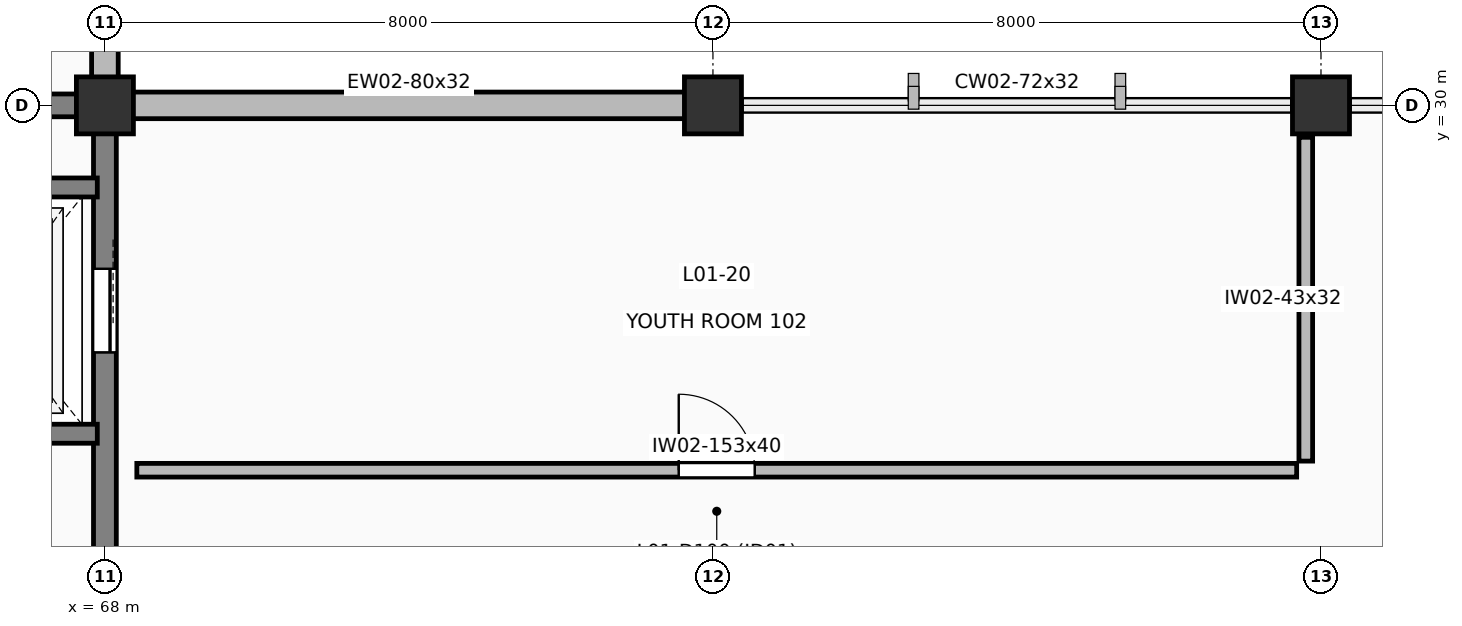
"""IFC4 building model, lengths in metres.
Left out: names, types, materials, properties, quantities, classifications, styles, units other than length and angle.
Written with IfcOpenShell. Run it as: python <this file> out.ifc"""

import sys

from ifc_helpers import new_model, si_unit, direction, frame, frame_2d, origin, origin_2d, place, context, subcontext, project, spatial, rectangle, extrude, element, fill, save


model = new_model("IFC4")
c1 = context("Model", 3, precision=1e-05, world=origin(), true_north=direction((0.0, 1.0)))
c2 = subcontext(c1, "Body", "Model", "MODEL_VIEW")
j1 = project(units=[si_unit("LENGTHUNIT", "METRE"), si_unit("PLANEANGLEUNIT", "RADIAN")], contexts=[c1])
p1 = place(None, origin())
s1 = spatial("IfcSite", under=j1, at=p1, CompositionType="ELEMENT")
p2 = place(p1, origin())
s2 = spatial("IfcBuilding", under=s1, at=p2, CompositionType="ELEMENT")
p3 = place(p2, frame((0.0, 0.0, 5.4)))
s3 = spatial("IfcBuildingStorey", under=s2, at=p3, CompositionType="ELEMENT", Elevation=5.4)
for number, where, z_axis, x_axis in (
    (1, (68.0, 30.0, 0.0), (0.0, 0.0, 1.0), (1.0, 0.0, 0.0)),
    (2, (76.0, 30.0, 0.0), (0.0, 0.0, 1.0), (1.0, 0.0, 0.0)),
    (3, (84.0, 30.0, 0.0), (0.0, 0.0, 1.0), (1.0, 0.0, 0.0)),
):
    element("IfcColumn", number, at=place(p3, frame(where, z_axis=z_axis, x_axis=x_axis)), inside=s3, PredefinedType="COLUMN", context=c2, shape_type="SweptSolid", body=[
        extrude(rectangle(XDim=0.75, YDim=0.75, at=origin_2d()), origin(), (0.0, 0.0, 1.0), 4.2),
    ])
p4 = place(p3, frame((68.0, 38.0, 0.0), z_axis=(0.0, 0.0, 1.0), x_axis=(0.0, -1.0, 0.0)))
e4 = element("IfcWall", 4, at=p4, inside=s3, PredefinedType="SOLIDWALL", context=c2, shape_type="SweptSolid", body=[
    extrude(rectangle(XDim=8.0, YDim=0.35, at=frame_2d((4.0, 0.0))), origin(), (0.0, 0.0, 1.0), 3.245),
])
p5 = place(p3, frame((68.0, 30.0, 0.0), z_axis=(0.0, 0.0, 1.0), x_axis=(1.0, 0.0, 0.0)))
e5 = element("IfcWall", 5, at=p5, inside=s3, PredefinedType="SOLIDWALL", context=c2, shape_type="SweptSolid", body=[
    extrude(rectangle(XDim=8.0, YDim=0.35, at=frame_2d((4.0, 0.0))), origin(), (0.0, 0.0, 1.0), 3.165),
])
p6 = place(p3, frame((60.0, 30.0, 0.0), z_axis=(0.0, 0.0, 1.0), x_axis=(1.0, 0.0, 0.0)))
e6 = element("IfcWall", 6, at=p6, inside=s3, PredefinedType="SHEAR", context=c2, shape_type="SweptSolid", body=[
    extrude(rectangle(XDim=8.0, YDim=0.3, at=frame_2d((4.0, 0.0))), origin(), (0.0, 0.0, 1.0), 4.2),
])
p7 = place(p3, frame((68.0, 30.0, 0.0), z_axis=(0.0, 0.0, 1.0), x_axis=(0.0, -1.0, 0.0)))
e7 = element("IfcWall", 7, at=p7, inside=s3, PredefinedType="SHEAR", context=c2, shape_type="SweptSolid", body=[
    extrude(rectangle(XDim=8.0, YDim=0.3, at=frame_2d((4.0, 0.0))), origin(), (0.0, 0.0, 1.0), 4.2),
])
p8 = place(p7, frame((6.3, 0.0, 0.0)))
e8 = element("IfcOpeningElement", 8, at=p8, cuts=e7, PredefinedType="OPENING", context=c2, shape_type="SweptSolid", body=[
    extrude(rectangle(XDim=1.1, YDim=2.2, at=frame_2d((0.55, 1.1))), frame((0.0, 0.16, 0.0), z_axis=(0.0, -1.0, 0.0), x_axis=(1.0, 0.0, 0.0)), (0.0, 0.0, 1.0), 0.32),
])
p9 = place(p7, frame((2.15, 0.0, 0.0)))
e9 = element("IfcOpeningElement", 9, at=p9, cuts=e7, PredefinedType="OPENING", context=c2, shape_type="SweptSolid", body=[
    extrude(rectangle(XDim=1.1, YDim=2.2, at=frame_2d((0.55, 1.1))), frame((0.0, 0.16, 0.0), z_axis=(0.0, -1.0, 0.0), x_axis=(1.0, 0.0, 0.0)), (0.0, 0.0, 1.0), 0.32),
])
for number, where, z_axis, x_axis in (
    (10, (65.2, 25.68, 0.0), (0.0, 0.0, 1.0), (1.0, 0.0, 0.0)),
    (11, (65.2, 28.92, 0.0), (0.0, 0.0, 1.0), (1.0, 0.0, 0.0)),
):
    element("IfcWall", number, at=place(p3, frame(where, z_axis=z_axis, x_axis=x_axis)), inside=s3, PredefinedType="SHEAR", context=c2, shape_type="SweptSolid", body=[
        extrude(rectangle(XDim=2.7, YDim=0.25, at=frame_2d((1.35, 0.0))), origin(), (0.0, 0.0, 1.0), 4.2),
    ])
p10 = place(p3, frame((68.42, 25.2, 0.0), z_axis=(0.0, 0.0, 1.0), x_axis=(1.0, 0.0, 0.0)))
e12 = element("IfcWall", 12, at=p10, inside=s3, PredefinedType="PARTITIONING", context=c2, shape_type="SweptSolid", body=[
    extrude(rectangle(XDim=15.26, YDim=0.18, at=frame_2d((7.63, 0.0))), origin(), (0.0, 0.0, 1.0), 3.98),
])
p11 = place(p10, frame((7.13, 0.0, 0.0)))
e13 = element("IfcOpeningElement", 13, at=p11, cuts=e12, PredefinedType="OPENING", context=c2, shape_type="SweptSolid", body=[
    extrude(rectangle(XDim=1.0, YDim=2.15, at=frame_2d((0.5, 1.075))), frame((0.0, 0.1, 0.0), z_axis=(0.0, -1.0, 0.0), x_axis=(1.0, 0.0, 0.0)), (0.0, 0.0, 1.0), 0.2),
])
p12 = place(p3, frame((83.8, 25.32, 0.0), z_axis=(0.0, 0.0, 1.0), x_axis=(0.0, 1.0, 0.0)))
e14 = element("IfcWall", 14, at=p12, inside=s3, PredefinedType="PARTITIONING", context=c2, shape_type="SweptSolid", body=[
    extrude(rectangle(XDim=4.26, YDim=0.18, at=frame_2d((2.13, 0.0))), origin(), (0.0, 0.0, 1.0), 3.225),
])
p13 = place(p9, origin())
e15 = element("IfcDoor", 15, at=p13, inside=s3, OperationType="SLIDING_TO_LEFT", PredefinedType="DOOR", context=c2, shape_type="SweptSolid", body=[
    extrude(rectangle(XDim=1.1, YDim=2.2, at=frame_2d((0.55, 1.1))), frame((0.0, 0.025, 0.0), z_axis=(0.0, -1.0, 0.0), x_axis=(1.0, 0.0, 0.0)), (0.0, 0.0, 1.0), 0.05),
])
fill(e9, e15)
p14 = place(p11, origin())
e16 = element("IfcDoor", 16, at=p14, inside=s3, OperationType="SINGLE_SWING_LEFT", PredefinedType="DOOR", context=c2, shape_type="SweptSolid", body=[
    extrude(rectangle(XDim=1.0, YDim=2.15, at=frame_2d((0.5, 1.075))), frame((0.0, 0.025, 0.0), z_axis=(0.0, -1.0, 0.0), x_axis=(1.0, 0.0, 0.0)), (0.0, 0.0, 1.0), 0.05),
])
fill(e13, e16)
save(model, sys.argv[1])
